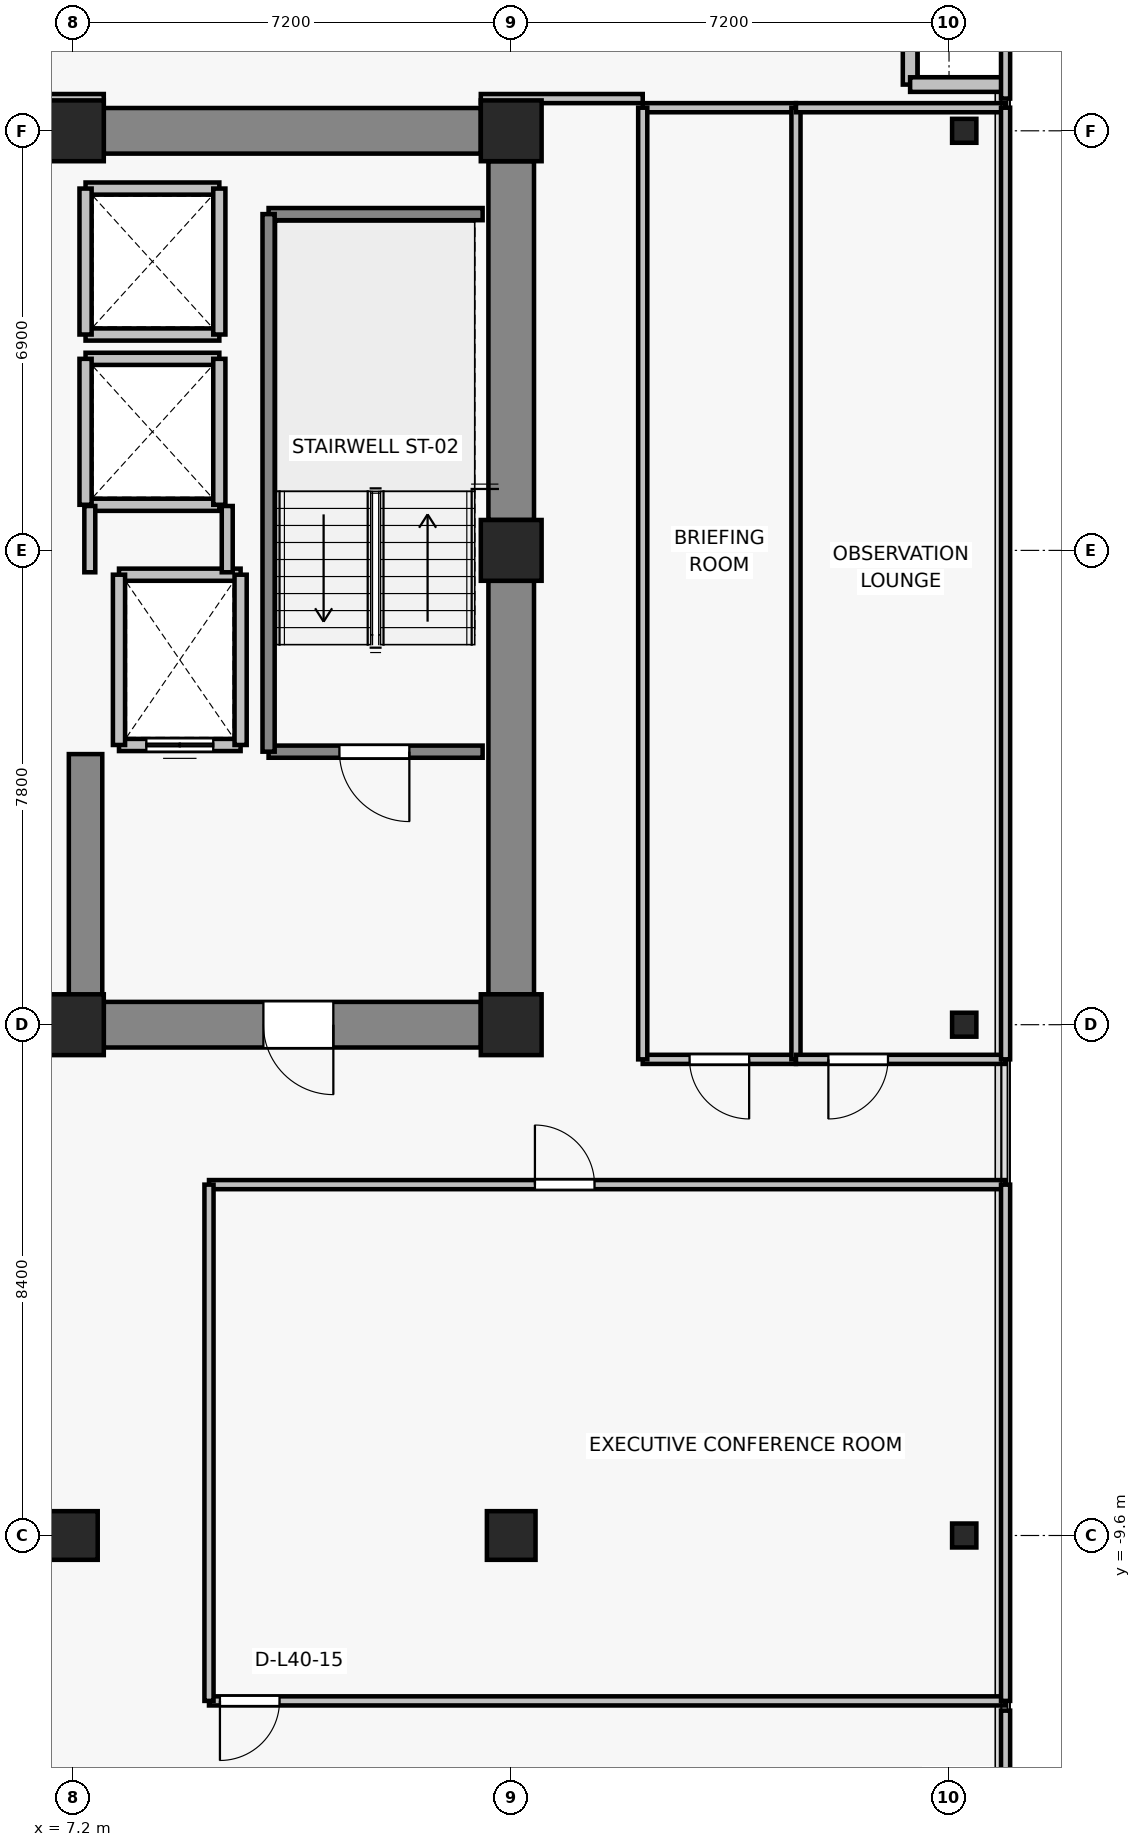
"""IFC4 building model, lengths in metres.
Left out: names, types, materials, properties, quantities, classifications, styles, units other than length and angle.
Written with IfcOpenShell. Run it as: python <this file> out.ifc"""

import sys

from ifc_helpers import new_model, si_unit, direction, frame, frame_2d, origin, origin_2d, place, context, subcontext, project, spatial, rectangle, i_section, extrude, source, transform, mapped, element, fill, save


model = new_model("IFC4")
c1 = context("Model", 3, precision=1e-05, world=origin(), true_north=direction((0.0, 1.0)))
c2 = subcontext(c1, "Body", "Model", "MODEL_VIEW")
j1 = project(units=[si_unit("LENGTHUNIT", "METRE"), si_unit("PLANEANGLEUNIT", "RADIAN")], contexts=[c1])
p1 = place(None, origin())
s1 = spatial("IfcSite", under=j1, at=p1, CompositionType="ELEMENT")
p2 = place(p1, origin())
s2 = spatial("IfcBuilding", under=s1, at=p2, CompositionType="ELEMENT")
p3 = place(p2, frame((0.0, 0.0, 146.2)))
s3 = spatial("IfcBuildingStorey", under=s2, at=p3, CompositionType="ELEMENT", Elevation=146.2)
for number, where, z_axis, x_axis in (
    (1, (7.2, -1.2, 0.0), (0.0, 0.0, 1.0), (1.0, 0.0, 0.0)),
    (2, (14.4, -1.2, 0.0), (0.0, 0.0, 1.0), (1.0, 0.0, 0.0)),
    (3, (14.4, 6.6, 0.0), (0.0, 0.0, 1.0), (1.0, 0.0, 0.0)),
    (4, (7.2, 13.5, 0.0), (0.0, 0.0, 1.0), (1.0, 0.0, 0.0)),
    (5, (14.4, 13.5, 0.0), (0.0, 0.0, 1.0), (1.0, 0.0, 0.0)),
):
    element("IfcColumn", number, at=place(p3, frame(where, z_axis=z_axis, x_axis=x_axis)), inside=s3, PredefinedType="COLUMN", context=c2, shape_type="SweptSolid", body=[
        extrude(rectangle(XDim=1.0, YDim=1.0, at=origin_2d()), origin(), (0.0, 0.0, 1.0), 3.3),
    ])
for number, where, z_axis, x_axis in (
    (6, (7.2, -9.6, 0.0), (0.0, 0.0, 1.0), (1.0, 0.0, 0.0)),
    (7, (14.4, -9.6, 0.0), (0.0, 0.0, 1.0), (1.0, 0.0, 0.0)),
):
    element("IfcColumn", number, at=place(p3, frame(where, z_axis=z_axis, x_axis=x_axis)), inside=s3, PredefinedType="COLUMN", context=c2, shape_type="SweptSolid", body=[
        extrude(rectangle(XDim=0.8, YDim=0.8, at=origin_2d()), origin(), (0.0, 0.0, 1.0), 3.3),
    ])
for number, where, z_axis, x_axis in (
    (8, (21.85, -9.6, 0.0), (0.0, 0.0, 1.0), (1.0, 0.0, 0.0)),
    (9, (21.85, -1.2, 0.0), (0.0, 0.0, 1.0), (1.0, 0.0, 0.0)),
    (10, (21.85, 13.5, 0.0), (0.0, 0.0, 1.0), (1.0, 0.0, 0.0)),
):
    element("IfcColumn", number, at=place(p3, frame(where, z_axis=z_axis, x_axis=x_axis)), inside=s3, PredefinedType="COLUMN", context=c2, shape_type="SweptSolid", body=[
        extrude(i_section(OverallWidth=0.399, OverallDepth=0.394, WebThickness=0.023, FlangeThickness=0.037, FilletRadius=0.015, at=origin_2d()), origin(), (0.0, 0.0, 1.0), 3.3),
    ])
p4 = place(p3, frame((7.7, 13.5, 0.0), z_axis=(0.0, 0.0, 1.0), x_axis=(1.0, 0.0, 0.0)))
e11 = element("IfcWall", 11, at=p4, inside=s3, PredefinedType="SHEAR", context=c2, shape_type="SweptSolid", body=[
    extrude(rectangle(XDim=6.2, YDim=0.75, at=frame_2d((3.1, 0.0))), origin(), (0.0, 0.0, 1.0), 3.075),
])
p5 = place(p3, frame((14.4, -0.7, 0.0), z_axis=(0.0, 0.0, 1.0), x_axis=(0.0, 1.0, 0.0)))
e12 = element("IfcWall", 12, at=p5, inside=s3, PredefinedType="SHEAR", context=c2, shape_type="SweptSolid", body=[
    extrude(rectangle(XDim=6.8, YDim=0.75, at=frame_2d((3.4, 0.0))), origin(), (0.0, 0.0, 1.0), 3.075),
])
p6 = place(p3, frame((14.4, 7.1, 0.0), z_axis=(0.0, 0.0, 1.0), x_axis=(0.0, 1.0, 0.0)))
e13 = element("IfcWall", 13, at=p6, inside=s3, PredefinedType="SHEAR", context=c2, shape_type="SweptSolid", body=[
    extrude(rectangle(XDim=5.9, YDim=0.75, at=frame_2d((2.95, 0.0))), origin(), (0.0, 0.0, 1.0), 3.075),
])
p7 = place(p3, frame((13.9, -1.2, 0.0), z_axis=(0.0, 0.0, 1.0), x_axis=(-1.0, 0.0, 0.0)))
e14 = element("IfcWall", 14, at=p7, inside=s3, PredefinedType="SHEAR", context=c2, shape_type="SweptSolid", body=[
    extrude(rectangle(XDim=6.2, YDim=0.75, at=frame_2d((3.1, 0.0))), origin(), (0.0, 0.0, 1.0), 3.075),
])
p8 = place(p7, frame((2.425, 0.0, 0.0)))
e15 = element("IfcOpeningElement", 15, at=p8, cuts=e14, PredefinedType="OPENING", context=c2, shape_type="SweptSolid", body=[
    extrude(rectangle(XDim=1.15, YDim=2.15, at=frame_2d((0.575, 1.075))), frame((0.0, 0.385, 0.0), z_axis=(0.0, -1.0, 0.0), x_axis=(1.0, 0.0, 0.0)), (0.0, 0.0, 1.0), 0.77),
])
p9 = place(p3, frame((7.4, -0.825, 0.0), z_axis=(0.0, 0.0, 1.0), x_axis=(0.0, 1.0, 0.0)))
e16 = element("IfcWall", 16, at=p9, inside=s3, PredefinedType="SHEAR", context=c2, shape_type="SweptSolid", body=[
    extrude(rectangle(XDim=4.075, YDim=0.55, at=frame_2d((2.038, 0.0))), origin(), (0.0, 0.0, 1.0), 3.075),
])
for number, where, z_axis, x_axis in (
    (17, (20.96, 14.26, 0.0), (0.0, 0.0, 1.0), (0.0, 1.0, 0.0)),
    (18, (22.46, 14.26, 0.0), (0.0, 0.0, 1.0), (-1.0, 0.0, 0.0)),
):
    element("IfcWall", number, at=place(p3, frame(where, z_axis=z_axis, x_axis=x_axis)), inside=s3, PredefinedType="SOLIDWALL", context=c2, shape_type="SweptSolid", body=[
        extrude(rectangle(XDim=1.5, YDim=0.24, at=frame_2d((0.75, 0.0))), origin(), (0.0, 0.0, 1.0), 3.075),
    ])
p10 = place(p3, frame((9.95, 3.4, 0.0), z_axis=(0.0, 0.0, 1.0), x_axis=(-1.0, 0.0, 0.0)))
e19 = element("IfcWall", 19, at=p10, inside=s3, PredefinedType="SOLIDWALL", context=c2, shape_type="SweptSolid", body=[
    extrude(rectangle(XDim=2.0, YDim=0.2, at=frame_2d((1.0, 0.0))), origin(), (0.0, 0.0, 1.0), 3.075),
])
p11 = place(p10, frame((0.45, 0.0, 0.0)))
e20 = element("IfcOpeningElement", 20, at=p11, cuts=e19, PredefinedType="OPENING", context=c2, shape_type="SweptSolid", body=[
    extrude(rectangle(XDim=1.1, YDim=2.2, at=frame_2d((0.55, 1.1))), frame((0.0, 0.11, 0.0), z_axis=(0.0, -1.0, 0.0), x_axis=(1.0, 0.0, 0.0)), (0.0, 0.0, 1.0), 0.22),
])
p12 = place(p3, frame((7.95, 6.2, 0.0), z_axis=(0.0, 0.0, 1.0), x_axis=(1.0, 0.0, 0.0)))
e21 = element("IfcWall", 21, at=p12, inside=s3, PredefinedType="SOLIDWALL", context=c2, shape_type="SweptSolid", body=[
    extrude(rectangle(XDim=2.0, YDim=0.2, at=frame_2d((1.0, 0.0))), origin(), (0.0, 0.0, 1.0), 3.075),
])
for number, where, z_axis, x_axis in (
    (22, (7.95, 3.4, 0.0), (0.0, 0.0, 1.0), (0.0, 1.0, 0.0)),
    (23, (9.95, 6.2, 0.0), (0.0, 0.0, 1.0), (0.0, -1.0, 0.0)),
):
    element("IfcWall", number, at=place(p3, frame(where, z_axis=z_axis, x_axis=x_axis)), inside=s3, PredefinedType="SOLIDWALL", context=c2, shape_type="SweptSolid", body=[
        extrude(rectangle(XDim=2.8, YDim=0.2, at=frame_2d((1.4, 0.0))), origin(), (0.0, 0.0, 1.0), 3.075),
    ])
for number, where, z_axis, x_axis in (
    (24, (9.6, 7.35, 0.0), (0.0, 0.0, 1.0), (-1.0, 0.0, 0.0)),
    (25, (7.4, 9.75, 0.0), (0.0, 0.0, 1.0), (1.0, 0.0, 0.0)),
):
    element("IfcWall", number, at=place(p3, frame(where, z_axis=z_axis, x_axis=x_axis)), inside=s3, PredefinedType="SOLIDWALL", context=c2, shape_type="SweptSolid", body=[
        extrude(rectangle(XDim=2.2, YDim=0.2, at=frame_2d((1.1, 0.0))), origin(), (0.0, 0.0, 1.0), 2.565),
    ])
p13 = place(p3, frame((7.4, 7.35, 0.0), z_axis=(0.0, 0.0, 1.0), x_axis=(0.0, 1.0, 0.0)))
e26 = element("IfcWall", 26, at=p13, inside=s3, PredefinedType="SOLIDWALL", context=c2, shape_type="SweptSolid", body=[
    extrude(rectangle(XDim=2.4, YDim=0.2, at=frame_2d((1.2, 0.0))), origin(), (0.0, 0.0, 1.0), 2.565),
])
p14 = place(p3, frame((9.6, 9.75, 0.0), z_axis=(0.0, 0.0, 1.0), x_axis=(0.0, -1.0, 0.0)))
e27 = element("IfcWall", 27, at=p14, inside=s3, PredefinedType="SOLIDWALL", context=c2, shape_type="SweptSolid", body=[
    extrude(rectangle(XDim=2.4, YDim=0.2, at=frame_2d((1.2, 0.0))), origin(), (0.0, 0.0, 1.0), 3.075),
])
for number, where, z_axis, x_axis in (
    (28, (9.6, 10.15, 0.0), (0.0, 0.0, 1.0), (-1.0, 0.0, 0.0)),
    (29, (7.4, 12.55, 0.0), (0.0, 0.0, 1.0), (1.0, 0.0, 0.0)),
):
    element("IfcWall", number, at=place(p3, frame(where, z_axis=z_axis, x_axis=x_axis)), inside=s3, PredefinedType="SOLIDWALL", context=c2, shape_type="SweptSolid", body=[
        extrude(rectangle(XDim=2.2, YDim=0.2, at=frame_2d((1.1, 0.0))), origin(), (0.0, 0.0, 1.0), 2.565),
    ])
p15 = place(p3, frame((7.4, 10.15, 0.0), z_axis=(0.0, 0.0, 1.0), x_axis=(0.0, 1.0, 0.0)))
e30 = element("IfcWall", 30, at=p15, inside=s3, PredefinedType="SOLIDWALL", context=c2, shape_type="SweptSolid", body=[
    extrude(rectangle(XDim=2.4, YDim=0.2, at=frame_2d((1.2, 0.0))), origin(), (0.0, 0.0, 1.0), 2.565),
])
p16 = place(p3, frame((9.6, 12.55, 0.0), z_axis=(0.0, 0.0, 1.0), x_axis=(0.0, -1.0, 0.0)))
e31 = element("IfcWall", 31, at=p16, inside=s3, PredefinedType="SOLIDWALL", context=c2, shape_type="SweptSolid", body=[
    extrude(rectangle(XDim=2.4, YDim=0.2, at=frame_2d((1.2, 0.0))), origin(), (0.0, 0.0, 1.0), 3.075),
])
p17 = place(p3, frame((13.93, 3.29, 0.0), z_axis=(0.0, 0.0, 1.0), x_axis=(-1.0, 0.0, 0.0)))
e32 = element("IfcWall", 32, at=p17, inside=s3, PredefinedType="SOLIDWALL", context=c2, shape_type="SweptSolid", body=[
    extrude(rectangle(XDim=3.52, YDim=0.2, at=frame_2d((1.76, 0.0))), origin(), (0.0, 0.0, 1.0), 3.075),
])
p18 = place(p17, frame((1.205, 0.0, 0.0)))
e33 = element("IfcOpeningElement", 33, at=p18, cuts=e32, PredefinedType="OPENING", context=c2, shape_type="SweptSolid", body=[
    extrude(rectangle(XDim=1.15, YDim=2.15, at=frame_2d((0.575, 1.075))), frame((0.0, 0.11, 0.0), z_axis=(0.0, -1.0, 0.0), x_axis=(1.0, 0.0, 0.0)), (0.0, 0.0, 1.0), 0.22),
])
p19 = place(p3, frame((10.41, 12.13, 0.0), z_axis=(0.0, 0.0, 1.0), x_axis=(1.0, 0.0, 0.0)))
e34 = element("IfcWall", 34, at=p19, inside=s3, PredefinedType="SOLIDWALL", context=c2, shape_type="SweptSolid", body=[
    extrude(rectangle(XDim=3.52, YDim=0.2, at=frame_2d((1.76, 0.0))), origin(), (0.0, 0.0, 1.0), 3.075),
])
p20 = place(p3, frame((10.41, 3.29, 0.0), z_axis=(0.0, 0.0, 1.0), x_axis=(0.0, 1.0, 0.0)))
e35 = element("IfcWall", 35, at=p20, inside=s3, PredefinedType="SOLIDWALL", context=c2, shape_type="SweptSolid", body=[
    extrude(rectangle(XDim=8.84, YDim=0.2, at=frame_2d((4.42, 0.0))), origin(), (0.0, 0.0, 1.0), 3.075),
])
p21 = place(p3, frame((7.47, 6.24, 0.0), z_axis=(0.0, 0.0, 1.0), x_axis=(0.0, 1.0, 0.0)))
e36 = element("IfcWall", 36, at=p21, inside=s3, PredefinedType="PARTITIONING", context=c2, shape_type="SweptSolid", body=[
    extrude(rectangle(XDim=1.09, YDim=0.18, at=frame_2d((0.545, 0.0))), origin(), (0.0, 0.0, 1.0), 2.565),
])
p22 = place(p3, frame((9.73, 7.33, 0.0), z_axis=(0.0, 0.0, 1.0), x_axis=(0.0, -1.0, 0.0)))
e37 = element("IfcWall", 37, at=p22, inside=s3, PredefinedType="PARTITIONING", context=c2, shape_type="SweptSolid", body=[
    extrude(rectangle(XDim=1.09, YDim=0.18, at=frame_2d((0.545, 0.0))), origin(), (0.0, 0.0, 1.0), 3.075),
])
p23 = place(p3, frame((22.53, -12.32, 0.0), z_axis=(0.0, 0.0, 1.0), x_axis=(-1.0, 0.0, 0.0)))
e38 = element("IfcWall", 38, at=p23, inside=s3, PredefinedType="PARTITIONING", context=c2, shape_type="SweptSolid", body=[
    extrude(rectangle(XDim=13.1, YDim=0.15, at=frame_2d((6.55, 0.0))), origin(), (0.0, 0.0, 1.0), 2.565),
])
p24 = place(p23, frame((11.94, 0.0, 0.0)))
e39 = element("IfcOpeningElement", 39, at=p24, cuts=e38, PredefinedType="OPENING", context=c2, shape_type="SweptSolid", body=[
    extrude(rectangle(XDim=0.98, YDim=2.15, at=frame_2d((0.49, 1.075))), frame((0.0, 0.085, 0.0), z_axis=(0.0, -1.0, 0.0), x_axis=(1.0, 0.0, 0.0)), (0.0, 0.0, 1.0), 0.17),
])
p25 = place(p3, frame((9.43, -3.83, 0.0), z_axis=(0.0, 0.0, 1.0), x_axis=(1.0, 0.0, 0.0)))
e40 = element("IfcWall", 40, at=p25, inside=s3, PredefinedType="PARTITIONING", context=c2, shape_type="SweptSolid", body=[
    extrude(rectangle(XDim=13.1, YDim=0.15, at=frame_2d((6.55, 0.0))), origin(), (0.0, 0.0, 1.0), 2.565),
])
p26 = place(p25, frame((5.36, 0.0, 0.0)))
e41 = element("IfcOpeningElement", 41, at=p26, cuts=e40, PredefinedType="OPENING", context=c2, shape_type="SweptSolid", body=[
    extrude(rectangle(XDim=0.98, YDim=2.15, at=frame_2d((0.49, 1.075))), frame((0.0, 0.085, 0.0), z_axis=(0.0, -1.0, 0.0), x_axis=(1.0, 0.0, 0.0)), (0.0, 0.0, 1.0), 0.17),
])
p27 = place(p3, frame((9.43, -12.32, 0.0), z_axis=(0.0, 0.0, 1.0), x_axis=(0.0, 1.0, 0.0)))
e42 = element("IfcWall", 42, at=p27, inside=s3, PredefinedType="PARTITIONING", context=c2, shape_type="SweptSolid", body=[
    extrude(rectangle(XDim=8.49, YDim=0.15, at=frame_2d((4.245, 0.0))), origin(), (0.0, 0.0, 1.0), 2.565),
])
p28 = place(p3, frame((22.53, -3.83, 0.0), z_axis=(0.0, 0.0, 1.0), x_axis=(0.0, -1.0, 0.0)))
e43 = element("IfcWall", 43, at=p28, inside=s3, PredefinedType="PARTITIONING", context=c2, shape_type="SweptSolid", body=[
    extrude(rectangle(XDim=8.49, YDim=0.15, at=frame_2d((4.245, 0.0))), origin(), (0.0, 0.0, 1.0), 2.665),
])
p29 = place(p3, frame((22.53, -12.48, 0.0), z_axis=(0.0, 0.0, 1.0), x_axis=(0.0, -1.0, 0.0)))
e44 = element("IfcWall", 44, at=p29, inside=s3, PredefinedType="PARTITIONING", context=c2, shape_type="SweptSolid", body=[
    extrude(rectangle(XDim=4.85, YDim=0.15, at=frame_2d((2.425, 0.0))), origin(), (0.0, 0.0, 1.0), 3.075),
])
p30 = place(p3, frame((19.083, -1.77, 0.0), z_axis=(0.0, 0.0, 1.0), x_axis=(-1.0, 0.0, 0.0)))
e45 = element("IfcWall", 45, at=p30, inside=s3, PredefinedType="PARTITIONING", context=c2, shape_type="SweptSolid", body=[
    extrude(rectangle(XDim=2.52, YDim=0.15, at=frame_2d((1.26, 0.0))), origin(), (0.0, 0.0, 1.0), 3.075),
])
p31 = place(p30, frame((0.77, 0.0, 0.0)))
e46 = element("IfcOpeningElement", 46, at=p31, cuts=e45, PredefinedType="OPENING", context=c2, shape_type="SweptSolid", body=[
    extrude(rectangle(XDim=0.98, YDim=2.15, at=frame_2d((0.49, 1.075))), frame((0.0, 0.085, 0.0), z_axis=(0.0, -1.0, 0.0), x_axis=(1.0, 0.0, 0.0)), (0.0, 0.0, 1.0), 0.17),
])
p32 = place(p3, frame((16.563, 13.88, 0.0), z_axis=(0.0, 0.0, 1.0), x_axis=(1.0, 0.0, 0.0)))
e47 = element("IfcWall", 47, at=p32, inside=s3, PredefinedType="PARTITIONING", context=c2, shape_type="SweptSolid", body=[
    extrude(rectangle(XDim=2.52, YDim=0.15, at=frame_2d((1.26, 0.0))), origin(), (0.0, 0.0, 1.0), 3.075),
])
for number, where, z_axis, x_axis in (
    (48, (16.563, -1.77, 0.0), (0.0, 0.0, 1.0), (0.0, 1.0, 0.0)),
    (49, (19.083, 13.88, 0.0), (0.0, 0.0, 1.0), (0.0, -1.0, 0.0)),
):
    element("IfcWall", number, at=place(p3, frame(where, z_axis=z_axis, x_axis=x_axis)), inside=s3, PredefinedType="PARTITIONING", context=c2, shape_type="SweptSolid", body=[
        extrude(rectangle(XDim=15.65, YDim=0.15, at=frame_2d((7.825, 0.0))), origin(), (0.0, 0.0, 1.0), 2.565),
    ])
p33 = place(p3, frame((22.53, -1.77, 0.0), z_axis=(0.0, 0.0, 1.0), x_axis=(-1.0, 0.0, 0.0)))
e50 = element("IfcWall", 50, at=p33, inside=s3, PredefinedType="PARTITIONING", context=c2, shape_type="SweptSolid", body=[
    extrude(rectangle(XDim=3.447, YDim=0.15, at=frame_2d((1.724, 0.0))), origin(), (0.0, 0.0, 1.0), 2.565),
])
p34 = place(p33, frame((1.934, 0.0, 0.0)))
e51 = element("IfcOpeningElement", 51, at=p34, cuts=e50, PredefinedType="OPENING", context=c2, shape_type="SweptSolid", body=[
    extrude(rectangle(XDim=0.98, YDim=2.15, at=frame_2d((0.49, 1.075))), frame((0.0, 0.085, 0.0), z_axis=(0.0, -1.0, 0.0), x_axis=(1.0, 0.0, 0.0)), (0.0, 0.0, 1.0), 0.17),
])
p35 = place(p3, frame((19.083, 13.88, 0.0), z_axis=(0.0, 0.0, 1.0), x_axis=(1.0, 0.0, 0.0)))
e52 = element("IfcWall", 52, at=p35, inside=s3, PredefinedType="PARTITIONING", context=c2, shape_type="SweptSolid", body=[
    extrude(rectangle(XDim=3.447, YDim=0.15, at=frame_2d((1.724, 0.0))), origin(), (0.0, 0.0, 1.0), 3.075),
])
p36 = place(p3, frame((22.53, 13.88, 0.0), z_axis=(0.0, 0.0, 1.0), x_axis=(0.0, -1.0, 0.0)))
e53 = element("IfcWall", 53, at=p36, inside=s3, PredefinedType="PARTITIONING", context=c2, shape_type="SweptSolid", body=[
    extrude(rectangle(XDim=15.65, YDim=0.15, at=frame_2d((7.825, 0.0))), origin(), (0.0, 0.0, 1.0), 3.075),
])
p37 = place(p3, frame((7.7, 14.03, 0.0), z_axis=(0.0, 0.0, 1.0), x_axis=(-1.0, 0.0, 0.0)))
e54 = element("IfcWall", 54, at=p37, inside=s3, PredefinedType="PARTITIONING", context=c2, shape_type="SweptSolid", body=[
    extrude(rectangle(XDim=1.0, YDim=0.15, at=frame_2d((0.5, 0.0))), origin(), (0.0, 0.0, 1.0), 2.565),
])
p38 = place(p3, frame((16.563, 14.03, 0.0), z_axis=(0.0, 0.0, 1.0), x_axis=(-1.0, 0.0, 0.0)))
e55 = element("IfcWall", 55, at=p38, inside=s3, PredefinedType="PARTITIONING", context=c2, shape_type="SweptSolid", body=[
    extrude(rectangle(XDim=2.663, YDim=0.15, at=frame_2d((1.332, 0.0))), origin(), (0.0, 0.0, 1.0), 2.565),
])
p39 = place(p3, frame((22.53, 17.33, 0.0), z_axis=(0.0, 0.0, 1.0), x_axis=(0.0, -1.0, 0.0)))
e56 = element("IfcWall", 56, at=p39, inside=s3, PredefinedType="PARTITIONING", context=c2, shape_type="SweptSolid", body=[
    extrude(rectangle(XDim=3.3, YDim=0.15, at=frame_2d((1.65, 0.0))), origin(), (0.0, 0.0, 1.0), 3.075),
])
m1 = source(origin(), c2, "Body", "SweptSolid", [
    extrude(rectangle(XDim=1.1, YDim=2.2, at=frame_2d((0.55, 1.1))), frame((0.0, 0.025, 0.0), z_axis=(0.0, -1.0, 0.0), x_axis=(1.0, 0.0, 0.0)), (0.0, 0.0, 1.0), 0.05),
])
p40 = place(p11, origin())
e57 = element("IfcDoor", 57, at=p40, inside=s3, OperationType="DOUBLE_DOOR_SLIDING", PredefinedType="DOOR", context=c2, shape_type="MappedRepresentation", body=[
    mapped(m1, transform((0.0, 0.0, 0.0), x_axis=(1.0, 0.0, 0.0), y_axis=(0.0, 1.0, 0.0), z_axis=(0.0, 0.0, 1.0), scale=1.0)),
])
fill(e20, e57)
m2 = source(origin(), c2, "Body", "SweptSolid", [
    extrude(rectangle(XDim=1.15, YDim=2.15, at=frame_2d((0.575, 1.075))), frame((0.0, 0.025, 0.0), z_axis=(0.0, -1.0, 0.0), x_axis=(1.0, 0.0, 0.0)), (0.0, 0.0, 1.0), 0.05),
])
p41 = place(p18, origin())
e58 = element("IfcDoor", 58, at=p41, inside=s3, OperationType="SINGLE_SWING_LEFT", PredefinedType="DOOR", context=c2, shape_type="MappedRepresentation", body=[
    mapped(m2, transform((0.0, 0.0, 0.0), x_axis=(1.0, 0.0, 0.0), y_axis=(0.0, 1.0, 0.0), z_axis=(0.0, 0.0, 1.0), scale=1.0)),
])
fill(e33, e58)
p42 = place(p8, origin())
e59 = element("IfcDoor", 59, at=p42, inside=s3, OperationType="SINGLE_SWING_LEFT", PredefinedType="DOOR", context=c2, shape_type="MappedRepresentation", body=[
    mapped(m2, transform((0.0, 0.0, 0.0), x_axis=(1.0, 0.0, 0.0), y_axis=(0.0, 1.0, 0.0), z_axis=(0.0, 0.0, 1.0), scale=1.0)),
])
fill(e15, e59)
m3 = source(origin(), c2, "Body", "SweptSolid", [
    extrude(rectangle(XDim=0.98, YDim=2.15, at=frame_2d((0.49, 1.075))), frame((0.0, 0.025, 0.0), z_axis=(0.0, -1.0, 0.0), x_axis=(1.0, 0.0, 0.0)), (0.0, 0.0, 1.0), 0.05),
])
p43 = place(p26, origin())
e60 = element("IfcDoor", 60, at=p43, inside=s3, OperationType="SINGLE_SWING_LEFT", PredefinedType="DOOR", context=c2, shape_type="MappedRepresentation", body=[
    mapped(m3, transform((0.0, 0.0, 0.0), x_axis=(1.0, 0.0, 0.0), y_axis=(0.0, 1.0, 0.0), z_axis=(0.0, 0.0, 1.0), scale=1.0)),
])
fill(e41, e60)
p44 = place(p24, origin())
e61 = element("IfcDoor", 61, at=p44, inside=s3, OperationType="SINGLE_SWING_RIGHT", PredefinedType="DOOR", context=c2, shape_type="MappedRepresentation", body=[
    mapped(m3, transform((0.0, 0.0, 0.0), x_axis=(1.0, 0.0, 0.0), y_axis=(0.0, 1.0, 0.0), z_axis=(0.0, 0.0, 1.0), scale=1.0)),
])
fill(e39, e61)
p45 = place(p31, origin())
e62 = element("IfcDoor", 62, at=p45, inside=s3, OperationType="SINGLE_SWING_LEFT", PredefinedType="DOOR", context=c2, shape_type="MappedRepresentation", body=[
    mapped(m3, transform((0.0, 0.0, 0.0), x_axis=(1.0, 0.0, 0.0), y_axis=(0.0, 1.0, 0.0), z_axis=(0.0, 0.0, 1.0), scale=1.0)),
])
fill(e46, e62)
p46 = place(p34, origin())
e63 = element("IfcDoor", 63, at=p46, inside=s3, OperationType="SINGLE_SWING_RIGHT", PredefinedType="DOOR", context=c2, shape_type="MappedRepresentation", body=[
    mapped(m3, transform((0.0, 0.0, 0.0), x_axis=(1.0, 0.0, 0.0), y_axis=(0.0, 1.0, 0.0), z_axis=(0.0, 0.0, 1.0), scale=1.0)),
])
fill(e51, e63)
save(model, sys.argv[1])
